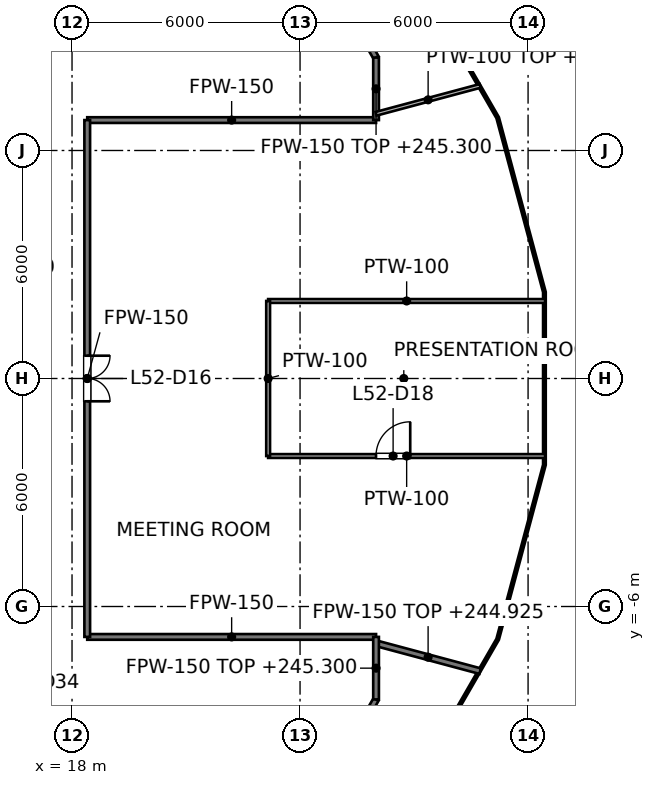
"""IFC4 building model, lengths in metres.
Left out: names, types, materials, properties, quantities, classifications, styles, units other than length and angle.
Written with IfcOpenShell. Run it as: python <this file> out.ifc"""

import sys

from ifc_helpers import new_model, si_unit, direction, frame, frame_2d, origin, place, context, subcontext, project, spatial, rectangle, extrude, element, fill, save


model = new_model("IFC4")
c1 = context("Model", 3, precision=1e-05, world=origin(), true_north=direction((0.0, 1.0)))
c2 = subcontext(c1, "Body", "Model", "MODEL_VIEW")
j1 = project(units=[si_unit("LENGTHUNIT", "METRE"), si_unit("PLANEANGLEUNIT", "RADIAN")], contexts=[c1])
p1 = place(None, origin())
s1 = spatial("IfcSite", under=j1, at=p1, CompositionType="ELEMENT")
p2 = place(p1, origin())
s2 = spatial("IfcBuilding", under=s1, at=p2, CompositionType="ELEMENT")
p3 = place(p2, frame((0.0, 0.0, 241.6)))
s3 = spatial("IfcBuildingStorey", under=s2, at=p3, CompositionType="ELEMENT", Elevation=241.6)
p4 = place(p3, frame((25.333, 9.6, 0.0), z_axis=(0.0, 0.0, 1.0), x_axis=(0.500076310463, -0.865981341435, 0.0)))
e1 = element("IfcWall", 1, at=p4, inside=s3, PredefinedType="PARTITIONING", context=c2, shape_type="SweptSolid", body=[
    extrude(rectangle(XDim=1.334, YDim=0.15, at=frame_2d((0.667, 0.0))), origin(), (0.0, 0.0, 1.0), 2.768),
])
p5 = place(p3, frame((26.0, -6.967, 0.0), z_axis=(0.0, 0.0, 1.0), x_axis=(0.965928451997, -0.258809245628, 0.0)))
e2 = element("IfcWall", 2, at=p5, inside=s3, PredefinedType="PARTITIONING", context=c2, shape_type="SweptSolid", body=[
    extrude(rectangle(XDim=2.836, YDim=0.15, at=frame_2d((1.418, 0.0))), origin(), (0.0, 0.0, 1.0), 3.325),
])
for number, where, z_axis, x_axis in (
    (3, (18.4, -6.8, 0.0), (0.0, 0.0, 1.0), (1.0, 0.0, 0.0)),
    (4, (18.4, 6.8, 0.0), (0.0, 0.0, 1.0), (1.0, 0.0, 0.0)),
):
    element("IfcWall", number, at=place(p3, frame(where, z_axis=z_axis, x_axis=x_axis)), inside=s3, PredefinedType="PARTITIONING", context=c2, shape_type="SweptSolid", body=[
        extrude(rectangle(XDim=7.6, YDim=0.15, at=frame_2d((3.8, 0.0))), origin(), (0.0, 0.0, 1.0), 2.768),
    ])
p6 = place(p3, frame((25.333, -9.6, 0.0), z_axis=(0.0, 0.0, 1.0), x_axis=(0.500076310463, 0.865981341435, 0.0)))
e5 = element("IfcWall", 5, at=p6, inside=s3, PredefinedType="PARTITIONING", context=c2, shape_type="SweptSolid", body=[
    extrude(rectangle(XDim=1.334, YDim=0.15, at=frame_2d((0.667, 0.0))), origin(), (0.0, 0.0, 1.0), 2.768),
])
for number, where, z_axis, x_axis in (
    (6, (26.0, -8.445, 0.0), (0.0, 0.0, 1.0), (0.0, 1.0, 0.0)),
    (7, (26.0, 6.8, 0.0), (0.0, 0.0, 1.0), (0.0, 1.0, 0.0)),
):
    element("IfcWall", number, at=place(p3, frame(where, z_axis=z_axis, x_axis=x_axis)), inside=s3, PredefinedType="PARTITIONING", context=c2, shape_type="SweptSolid", body=[
        extrude(rectangle(XDim=1.645, YDim=0.15, at=frame_2d((0.823, 0.0))), origin(), (0.0, 0.0, 1.0), 3.7),
    ])
p7 = place(p3, frame((18.4, -6.8, 0.0), z_axis=(0.0, 0.0, 1.0), x_axis=(0.0, 1.0, 0.0)))
e8 = element("IfcWall", 8, at=p7, inside=s3, PredefinedType="PARTITIONING", context=c2, shape_type="SweptSolid", body=[
    extrude(rectangle(XDim=13.6, YDim=0.15, at=frame_2d((6.8, 0.0))), origin(), (0.0, 0.0, 1.0), 2.768),
])
p8 = place(p7, frame((6.2, 0.0, 0.0)))
e9 = element("IfcOpeningElement", 9, at=p8, cuts=e8, PredefinedType="OPENING", context=c2, shape_type="SweptSolid", body=[
    extrude(rectangle(XDim=1.2, YDim=2.1, at=frame_2d((0.6, 1.05))), frame((0.0, 0.075, 0.0), z_axis=(0.0, -1.0, 0.0), x_axis=(1.0, 0.0, 0.0)), (0.0, 0.0, 1.0), 0.15),
])
p9 = place(p3, frame((23.16, -2.04, 0.0), z_axis=(0.0, 0.0, 1.0), x_axis=(1.0, 0.0, 0.0)))
e10 = element("IfcWall", 10, at=p9, inside=s3, PredefinedType="PARTITIONING", context=c2, shape_type="SweptSolid", body=[
    extrude(rectangle(XDim=7.29, YDim=0.1, at=frame_2d((3.645, 0.0))), origin(), (0.0, 0.0, 1.0), 2.768),
])
p10 = place(p9, frame((2.839, 0.0, 0.0)))
e11 = element("IfcOpeningElement", 11, at=p10, cuts=e10, PredefinedType="OPENING", context=c2, shape_type="SweptSolid", body=[
    extrude(rectangle(XDim=0.9, YDim=2.1, at=frame_2d((0.45, 1.05))), frame((0.0, 0.05, 0.0), z_axis=(0.0, -1.0, 0.0), x_axis=(1.0, 0.0, 0.0)), (0.0, 0.0, 1.0), 0.1),
])
p11 = place(p3, frame((23.16, 2.04, 0.0), z_axis=(0.0, 0.0, 1.0), x_axis=(1.0, 0.0, 0.0)))
e12 = element("IfcWall", 12, at=p11, inside=s3, PredefinedType="PARTITIONING", context=c2, shape_type="SweptSolid", body=[
    extrude(rectangle(XDim=7.29, YDim=0.1, at=frame_2d((3.645, 0.0))), origin(), (0.0, 0.0, 1.0), 2.768),
])
p12 = place(p3, frame((26.0, 6.966, 0.0), z_axis=(0.0, 0.0, 1.0), x_axis=(0.965951508514, 0.258723178704, 0.0)))
e13 = element("IfcWall", 13, at=p12, inside=s3, PredefinedType="PARTITIONING", context=c2, shape_type="SweptSolid", body=[
    extrude(rectangle(XDim=2.837, YDim=0.1, at=frame_2d((1.418, 0.0))), origin(), (0.0, 0.0, 1.0), 3.325),
])
p13 = place(p3, frame((23.16, -2.04, 0.0), z_axis=(0.0, 0.0, 1.0), x_axis=(0.0, 1.0, 0.0)))
e14 = element("IfcWall", 14, at=p13, inside=s3, PredefinedType="PARTITIONING", context=c2, shape_type="SweptSolid", body=[
    extrude(rectangle(XDim=4.08, YDim=0.1, at=frame_2d((2.04, 0.0))), origin(), (0.0, 0.0, 1.0), 2.768),
])
p14 = place(p8, origin())
e15 = element("IfcDoor", 15, at=p14, inside=s3, OperationType="DOUBLE_DOOR_SINGLE_SWING", PredefinedType="DOOR", context=c2, shape_type="SweptSolid", body=[
    extrude(rectangle(XDim=1.2, YDim=2.1, at=frame_2d((0.6, 1.05))), frame((0.0, 0.025, 0.0), z_axis=(0.0, -1.0, 0.0), x_axis=(1.0, 0.0, 0.0)), (0.0, 0.0, 1.0), 0.05),
])
fill(e9, e15)
p15 = place(p10, origin())
e16 = element("IfcDoor", 16, at=p15, inside=s3, OperationType="SINGLE_SWING_RIGHT", PredefinedType="DOOR", context=c2, shape_type="SweptSolid", body=[
    extrude(rectangle(XDim=0.9, YDim=2.1, at=frame_2d((0.45, 1.05))), frame((0.0, 0.025, 0.0), z_axis=(0.0, -1.0, 0.0), x_axis=(1.0, 0.0, 0.0)), (0.0, 0.0, 1.0), 0.05),
])
fill(e11, e16)
save(model, sys.argv[1])
